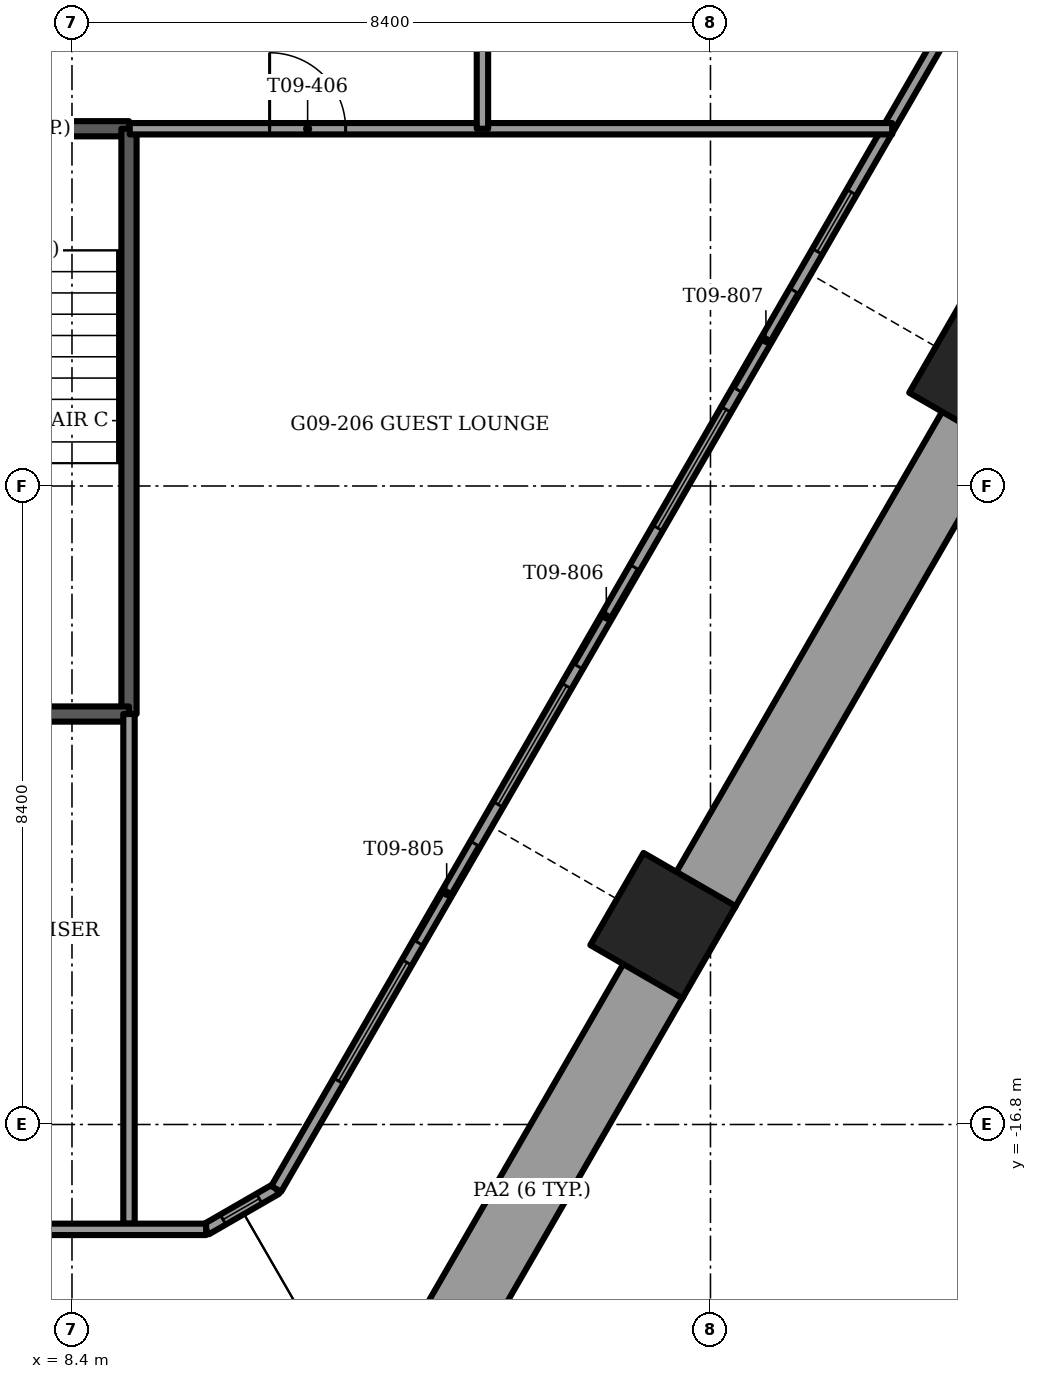
"""IFC4 building model, lengths in metres.
Left out: names, types, materials, properties, quantities, classifications, styles, units other than length and angle.
Written with IfcOpenShell. Run it as: python <this file> out.ifc"""

import sys

from ifc_helpers import new_model, si_unit, direction, frame, frame_2d, origin, origin_2d, place, context, subcontext, project, spatial, rectangle, extrude, element, fill, save


model = new_model("IFC4")
c1 = context("Model", 3, precision=1e-05, world=origin(), true_north=direction((0.0, 1.0)))
c2 = subcontext(c1, "Body", "Model", "MODEL_VIEW")
j1 = project(units=[si_unit("LENGTHUNIT", "METRE"), si_unit("PLANEANGLEUNIT", "RADIAN")], contexts=[c1])
p1 = place(None, origin())
s1 = spatial("IfcSite", under=j1, at=p1, CompositionType="ELEMENT")
p2 = place(p1, origin())
s2 = spatial("IfcBuilding", under=s1, at=p2, CompositionType="ELEMENT")
p3 = place(p2, frame((0.0, 0.0, 39.25)))
s3 = spatial("IfcBuildingStorey", under=s2, at=p3, CompositionType="ELEMENT", Elevation=39.25)
for number, where, z_axis, x_axis in (
    (1, (16.175, -14.183, -1.2), (0.0, 0.0, 1.0), (-0.5, -0.866, 0.0)),
    (2, (20.371, -6.917, -1.2), (0.0, 0.0, 1.0), (-0.5, -0.866, 0.0)),
):
    element("IfcColumn", number, at=place(p3, frame(where, z_axis=z_axis, x_axis=x_axis)), inside=s3, PredefinedType="COLUMN", context=c2, shape_type="SweptSolid", body=[
        extrude(rectangle(XDim=1.4, YDim=1.4, at=origin_2d()), origin(), (0.0, 0.0, 1.0), 3.75),
    ])
p4 = place(p3, frame((12.847, -20.448, 0.0), z_axis=(0.0, 0.0, 1.0), x_axis=(0.500000066162, 0.866025365586, 0.0)))
e3 = element("IfcWall", 3, at=p4, inside=s3, PredefinedType="PARAPET", context=c2, shape_type="SweptSolid", body=[
    extrude(rectangle(XDim=6.42, YDim=0.9, at=frame_2d((3.21, 0.0))), origin(), (0.0, 0.0, 1.0), 1.1),
])
p5 = place(p3, frame((16.727, -13.728, 0.0), z_axis=(0.0, 0.0, 1.0), x_axis=(0.499997206141, 0.866027016814, 0.0)))
e4 = element("IfcWall", 4, at=p5, inside=s3, PredefinedType="PARAPET", context=c2, shape_type="SweptSolid", body=[
    extrude(rectangle(XDim=7.051, YDim=0.9, at=frame_2d((3.525, 0.0))), origin(), (0.0, 0.0, 1.0), 1.1),
])
p6 = place(p3, frame((-10.165, -18.179, 0.0), z_axis=(0.0, 0.0, 1.0), x_axis=(1.0, 0.0, 0.0)))
e5 = element("IfcWall", 5, at=p6, inside=s3, PredefinedType="SOLIDWALL", context=c2, shape_type="SweptSolid", body=[
    extrude(rectangle(XDim=20.329, YDim=0.15, at=frame_2d((10.165, 0.0))), origin(), (0.0, 0.0, 1.0), 3.45),
])
p7 = place(p6, frame((2.064, 0.0, 0.15)))
e6 = element("IfcOpeningElement", 6, at=p7, cuts=e5, PredefinedType="OPENING", context=c2, shape_type="SweptSolid", body=[
    extrude(rectangle(XDim=1.8, YDim=2.85, at=frame_2d((0.9, 1.425))), frame((0.0, 0.075, 0.0), z_axis=(0.0, -1.0, 0.0), x_axis=(1.0, 0.0, 0.0)), (0.0, 0.0, 1.0), 0.15),
])
p8 = place(p6, frame((6.314, 0.0, 0.15)))
e7 = element("IfcOpeningElement", 7, at=p8, cuts=e5, PredefinedType="OPENING", context=c2, shape_type="SweptSolid", body=[
    extrude(rectangle(XDim=0.9, YDim=2.85, at=frame_2d((0.45, 1.425))), frame((0.0, 0.075, 0.0), z_axis=(0.0, -1.0, 0.0), x_axis=(1.0, 0.0, 0.0)), (0.0, 0.0, 1.0), 0.15),
])
p9 = place(p6, frame((7.764, 0.0, 0.0)))
e8 = element("IfcOpeningElement", 8, at=p9, cuts=e5, PredefinedType="OPENING", context=c2, shape_type="SweptSolid", body=[
    extrude(rectangle(XDim=1.5, YDim=2.4, at=frame_2d((0.75, 1.2))), frame((0.0, 0.075, 0.0), z_axis=(0.0, -1.0, 0.0), x_axis=(1.0, 0.0, 0.0)), (0.0, 0.0, 1.0), 0.15),
])
p10 = place(p6, frame((10.514, 0.0, 0.15)))
e9 = element("IfcOpeningElement", 9, at=p10, cuts=e5, PredefinedType="OPENING", context=c2, shape_type="SweptSolid", body=[
    extrude(rectangle(XDim=1.8, YDim=2.85, at=frame_2d((0.9, 1.425))), frame((0.0, 0.075, 0.0), z_axis=(0.0, -1.0, 0.0), x_axis=(1.0, 0.0, 0.0)), (0.0, 0.0, 1.0), 0.15),
])
p11 = place(p6, frame((12.564, 0.0, 0.0)))
e10 = element("IfcOpeningElement", 10, at=p11, cuts=e5, PredefinedType="OPENING", context=c2, shape_type="SweptSolid", body=[
    extrude(rectangle(XDim=1.5, YDim=2.4, at=frame_2d((0.75, 1.2))), frame((0.0, 0.075, 0.0), z_axis=(0.0, -1.0, 0.0), x_axis=(1.0, 0.0, 0.0)), (0.0, 0.0, 1.0), 0.15),
])
p12 = place(p6, frame((16.314, 0.0, 0.15)))
e11 = element("IfcOpeningElement", 11, at=p12, cuts=e5, PredefinedType="OPENING", context=c2, shape_type="SweptSolid", body=[
    extrude(rectangle(XDim=1.8, YDim=2.85, at=frame_2d((0.9, 1.425))), frame((0.0, 0.075, 0.0), z_axis=(0.0, -1.0, 0.0), x_axis=(1.0, 0.0, 0.0)), (0.0, 0.0, 1.0), 0.15),
])
p13 = place(p3, frame((11.087, -17.647, 0.0), z_axis=(0.0, 0.0, 1.0), x_axis=(0.499999841607, 0.866025495233, 0.0)))
e12 = element("IfcWall", 12, at=p13, inside=s3, PredefinedType="SOLIDWALL", context=c2, shape_type="SweptSolid", body=[
    extrude(rectangle(XDim=19.479, YDim=0.15, at=frame_2d((9.739, 0.0))), origin(), (0.0, 0.0, 1.0), 3.45),
])
p14 = place(p13, frame((1.639, 0.0, 0.15)))
e13 = element("IfcOpeningElement", 13, at=p14, cuts=e12, PredefinedType="OPENING", context=c2, shape_type="SweptSolid", body=[
    extrude(rectangle(XDim=1.8, YDim=2.85, at=frame_2d((0.9, 1.425))), frame((0.0, 0.075, 0.0), z_axis=(0.0, -1.0, 0.0), x_axis=(1.0, 0.0, 0.0)), (0.0, 0.0, 1.0), 0.15),
])
p15 = place(p13, frame((3.739, 0.0, 0.0)))
e14 = element("IfcOpeningElement", 14, at=p15, cuts=e12, PredefinedType="OPENING", context=c2, shape_type="SweptSolid", body=[
    extrude(rectangle(XDim=1.5, YDim=2.4, at=frame_2d((0.75, 1.2))), frame((0.0, 0.075, 0.0), z_axis=(0.0, -1.0, 0.0), x_axis=(1.0, 0.0, 0.0)), (0.0, 0.0, 1.0), 0.15),
])
p16 = place(p13, frame((5.839, 0.0, 0.15)))
e15 = element("IfcOpeningElement", 15, at=p16, cuts=e12, PredefinedType="OPENING", context=c2, shape_type="SweptSolid", body=[
    extrude(rectangle(XDim=1.8, YDim=2.85, at=frame_2d((0.9, 1.425))), frame((0.0, 0.075, 0.0), z_axis=(0.0, -1.0, 0.0), x_axis=(1.0, 0.0, 0.0)), (0.0, 0.0, 1.0), 0.15),
])
p17 = place(p13, frame((7.939, 0.0, 0.0)))
e16 = element("IfcOpeningElement", 16, at=p17, cuts=e12, PredefinedType="OPENING", context=c2, shape_type="SweptSolid", body=[
    extrude(rectangle(XDim=1.5, YDim=2.4, at=frame_2d((0.75, 1.2))), frame((0.0, 0.075, 0.0), z_axis=(0.0, -1.0, 0.0), x_axis=(1.0, 0.0, 0.0)), (0.0, 0.0, 1.0), 0.15),
])
p18 = place(p13, frame((10.039, 0.0, 0.15)))
e17 = element("IfcOpeningElement", 17, at=p18, cuts=e12, PredefinedType="OPENING", context=c2, shape_type="SweptSolid", body=[
    extrude(rectangle(XDim=1.8, YDim=2.85, at=frame_2d((0.9, 1.425))), frame((0.0, 0.075, 0.0), z_axis=(0.0, -1.0, 0.0), x_axis=(1.0, 0.0, 0.0)), (0.0, 0.0, 1.0), 0.15),
])
p19 = place(p13, frame((12.139, 0.0, 0.0)))
e18 = element("IfcOpeningElement", 18, at=p19, cuts=e12, PredefinedType="OPENING", context=c2, shape_type="SweptSolid", body=[
    extrude(rectangle(XDim=1.5, YDim=2.4, at=frame_2d((0.75, 1.2))), frame((0.0, 0.075, 0.0), z_axis=(0.0, -1.0, 0.0), x_axis=(1.0, 0.0, 0.0)), (0.0, 0.0, 1.0), 0.15),
])
p20 = place(p13, frame((14.239, 0.0, 0.15)))
e19 = element("IfcOpeningElement", 19, at=p20, cuts=e12, PredefinedType="OPENING", context=c2, shape_type="SweptSolid", body=[
    extrude(rectangle(XDim=0.9, YDim=2.85, at=frame_2d((0.45, 1.425))), frame((0.0, 0.075, 0.0), z_axis=(0.0, -1.0, 0.0), x_axis=(1.0, 0.0, 0.0)), (0.0, 0.0, 1.0), 0.15),
])
p21 = place(p3, frame((10.165, -18.179, 0.0), z_axis=(0.0, 0.0, 1.0), x_axis=(0.866048165231, 0.499960573946, 0.0)))
e20 = element("IfcWall", 20, at=p21, inside=s3, PredefinedType="SOLIDWALL", context=c2, shape_type="SweptSolid", body=[
    extrude(rectangle(XDim=1.065, YDim=0.15, at=frame_2d((0.532, 0.0))), origin(), (0.0, 0.0, 1.0), 3.45),
])
p22 = place(p21, frame((0.258, 0.0, 0.15)))
e21 = element("IfcOpeningElement", 21, at=p22, cuts=e20, PredefinedType="OPENING", context=c2, shape_type="SweptSolid", body=[
    extrude(rectangle(XDim=0.55, YDim=2.85, at=frame_2d((0.275, 1.425))), frame((0.0, 0.075, 0.0), z_axis=(0.0, -1.0, 0.0), x_axis=(1.0, 0.0, 0.0)), (0.0, 0.0, 1.0), 0.15),
])
p23 = place(p3, frame((5.8, -3.7, -0.3), z_axis=(0.0, 0.0, 1.0), x_axis=(1.0, 0.0, 0.0)))
e22 = element("IfcWall", 22, at=p23, inside=s3, PredefinedType="SOLIDWALL", context=c2, shape_type="SweptSolid", body=[
    extrude(rectangle(XDim=3.35, YDim=0.2, at=frame_2d((1.675, 0.0))), origin(), (0.0, 0.0, 1.0), 3.75),
])
p24 = place(p23, frame((1.125, 0.0, 0.0)))
e23 = element("IfcOpeningElement", 23, at=p24, cuts=e22, PredefinedType="OPENING", context=c2, shape_type="SweptSolid", body=[
    extrude(rectangle(XDim=1.1, YDim=2.1, at=frame_2d((0.55, 1.05))), frame((0.0, 0.1, 0.0), z_axis=(0.0, -1.0, 0.0), x_axis=(1.0, 0.0, 0.0)), (0.0, 0.0, 1.0), 0.2),
])
p25 = place(p3, frame((9.15, -3.7, -0.3), z_axis=(0.0, 0.0, 1.0), x_axis=(0.0, -1.0, 0.0)))
e24 = element("IfcWall", 24, at=p25, inside=s3, PredefinedType="SOLIDWALL", context=c2, shape_type="SweptSolid", body=[
    extrude(rectangle(XDim=7.7, YDim=0.2, at=frame_2d((3.85, 0.0))), origin(), (0.0, 0.0, 1.0), 3.75),
])
p26 = place(p3, frame((5.8, -11.4, -0.3), z_axis=(0.0, 0.0, 1.0), x_axis=(1.0, 0.0, 0.0)))
e25 = element("IfcWall", 25, at=p26, inside=s3, PredefinedType="SOLIDWALL", context=c2, shape_type="SweptSolid", body=[
    extrude(rectangle(XDim=3.35, YDim=0.2, at=frame_2d((1.675, 0.0))), origin(), (0.0, 0.0, 1.0), 3.75),
])
p27 = place(p3, frame((9.15, -11.4, 0.0), z_axis=(0.0, 0.0, 1.0), x_axis=(0.0, -1.0, 0.0)))
e26 = element("IfcWall", 26, at=p27, inside=s3, PredefinedType="PARTITIONING", context=c2, shape_type="SweptSolid", body=[
    extrude(rectangle(XDim=6.705, YDim=0.15, at=frame_2d((3.352, 0.0))), origin(), (0.0, 0.0, 1.0), 3.45),
])
p28 = place(p3, frame((9.16, -3.7, 0.0), z_axis=(0.0, 0.0, 1.0), x_axis=(1.0, 0.0, 0.0)))
e27 = element("IfcWall", 27, at=p28, inside=s3, PredefinedType="PARTITIONING", context=c2, shape_type="SweptSolid", body=[
    extrude(rectangle(XDim=10.031, YDim=0.15, at=frame_2d((5.016, 0.0))), origin(), (0.0, 0.0, 1.0), 3.45),
])
p29 = place(p28, frame((1.84, 0.0, 0.0)))
e28 = element("IfcOpeningElement", 28, at=p29, cuts=e27, PredefinedType="OPENING", context=c2, shape_type="SweptSolid", body=[
    extrude(rectangle(XDim=1.0, YDim=2.1, at=frame_2d((0.5, 1.05))), frame((0.0, 0.075, 0.0), z_axis=(0.0, -1.0, 0.0), x_axis=(1.0, 0.0, 0.0)), (0.0, 0.0, 1.0), 0.15),
])
p30 = place(p3, frame((13.8, -3.7, 0.0), z_axis=(0.0, 0.0, 1.0), x_axis=(0.0, 1.0, 0.0)))
e29 = element("IfcWall", 29, at=p30, inside=s3, PredefinedType="PARTITIONING", context=c2, shape_type="SweptSolid", body=[
    extrude(rectangle(XDim=16.247, YDim=0.15, at=frame_2d((8.124, 0.0))), origin(), (0.0, 0.0, 1.0), 3.45),
])
p31 = place(p30, frame((1.705, 0.0, 0.0)))
e30 = element("IfcOpeningElement", 30, at=p31, cuts=e29, PredefinedType="OPENING", context=c2, shape_type="SweptSolid", body=[
    extrude(rectangle(XDim=1.0, YDim=2.1, at=frame_2d((0.5, 1.05))), frame((0.0, 0.075, 0.0), z_axis=(0.0, -1.0, 0.0), x_axis=(1.0, 0.0, 0.0)), (0.0, 0.0, 1.0), 0.15),
])
p32 = place(p30, frame((7.9, 0.0, 0.0)))
e31 = element("IfcOpeningElement", 31, at=p32, cuts=e29, PredefinedType="OPENING", context=c2, shape_type="SweptSolid", body=[
    extrude(rectangle(XDim=1.0, YDim=2.1, at=frame_2d((0.5, 1.05))), frame((0.0, 0.075, 0.0), z_axis=(0.0, -1.0, 0.0), x_axis=(1.0, 0.0, 0.0)), (0.0, 0.0, 1.0), 0.15),
])
p33 = place(p30, frame((12.753, 0.0, 0.0)))
e32 = element("IfcOpeningElement", 32, at=p33, cuts=e29, PredefinedType="OPENING", context=c2, shape_type="SweptSolid", body=[
    extrude(rectangle(XDim=1.0, YDim=2.1, at=frame_2d((0.5, 1.05))), frame((0.0, 0.075, 0.0), z_axis=(0.0, -1.0, 0.0), x_axis=(1.0, 0.0, 0.0)), (0.0, 0.0, 1.0), 0.15),
])
p34 = place(p14, origin())
e33 = element("IfcWindow", 33, at=p34, inside=s3, PartitioningType="SINGLE_PANEL", PredefinedType="WINDOW", context=c2, shape_type="SweptSolid", body=[
    extrude(rectangle(XDim=1.8, YDim=2.85, at=frame_2d((0.9, 1.425))), frame((0.0, 0.03, 0.0), z_axis=(0.0, -1.0, 0.0), x_axis=(1.0, 0.0, 0.0)), (0.0, 0.0, 1.0), 0.06),
])
fill(e13, e33)
p35 = place(p15, origin())
e34 = element("IfcDoor", 34, at=p35, inside=s3, OperationType="SLIDING_TO_LEFT", PredefinedType="DOOR", context=c2, shape_type="SweptSolid", body=[
    extrude(rectangle(XDim=1.5, YDim=2.4, at=frame_2d((0.75, 1.2))), frame((0.0, 0.025, 0.0), z_axis=(0.0, -1.0, 0.0), x_axis=(1.0, 0.0, 0.0)), (0.0, 0.0, 1.0), 0.05),
])
fill(e14, e34)
p36 = place(p16, origin())
e35 = element("IfcWindow", 35, at=p36, inside=s3, PartitioningType="SINGLE_PANEL", PredefinedType="WINDOW", context=c2, shape_type="SweptSolid", body=[
    extrude(rectangle(XDim=1.8, YDim=2.85, at=frame_2d((0.9, 1.425))), frame((0.0, 0.03, 0.0), z_axis=(0.0, -1.0, 0.0), x_axis=(1.0, 0.0, 0.0)), (0.0, 0.0, 1.0), 0.06),
])
fill(e15, e35)
p37 = place(p17, origin())
e36 = element("IfcDoor", 36, at=p37, inside=s3, OperationType="SLIDING_TO_RIGHT", PredefinedType="DOOR", context=c2, shape_type="SweptSolid", body=[
    extrude(rectangle(XDim=1.5, YDim=2.4, at=frame_2d((0.75, 1.2))), frame((0.0, 0.025, 0.0), z_axis=(0.0, -1.0, 0.0), x_axis=(1.0, 0.0, 0.0)), (0.0, 0.0, 1.0), 0.05),
])
fill(e16, e36)
p38 = place(p18, origin())
e37 = element("IfcWindow", 37, at=p38, inside=s3, PartitioningType="SINGLE_PANEL", PredefinedType="WINDOW", context=c2, shape_type="SweptSolid", body=[
    extrude(rectangle(XDim=1.8, YDim=2.85, at=frame_2d((0.9, 1.425))), frame((0.0, 0.03, 0.0), z_axis=(0.0, -1.0, 0.0), x_axis=(1.0, 0.0, 0.0)), (0.0, 0.0, 1.0), 0.06),
])
fill(e17, e37)
p39 = place(p19, origin())
e38 = element("IfcDoor", 38, at=p39, inside=s3, OperationType="SLIDING_TO_LEFT", PredefinedType="DOOR", context=c2, shape_type="SweptSolid", body=[
    extrude(rectangle(XDim=1.5, YDim=2.4, at=frame_2d((0.75, 1.2))), frame((0.0, 0.025, 0.0), z_axis=(0.0, -1.0, 0.0), x_axis=(1.0, 0.0, 0.0)), (0.0, 0.0, 1.0), 0.05),
])
fill(e18, e38)
p40 = place(p20, origin())
e39 = element("IfcWindow", 39, at=p40, inside=s3, PartitioningType="SINGLE_PANEL", PredefinedType="WINDOW", context=c2, shape_type="SweptSolid", body=[
    extrude(rectangle(XDim=0.9, YDim=2.85, at=frame_2d((0.45, 1.425))), frame((0.0, 0.03, 0.0), z_axis=(0.0, -1.0, 0.0), x_axis=(1.0, 0.0, 0.0)), (0.0, 0.0, 1.0), 0.06),
])
fill(e19, e39)
p41 = place(p22, origin())
e40 = element("IfcWindow", 40, at=p41, inside=s3, PartitioningType="SINGLE_PANEL", PredefinedType="WINDOW", context=c2, shape_type="SweptSolid", body=[
    extrude(rectangle(XDim=0.55, YDim=2.85, at=frame_2d((0.275, 1.425))), frame((0.0, 0.03, 0.0), z_axis=(0.0, -1.0, 0.0), x_axis=(1.0, 0.0, 0.0)), (0.0, 0.0, 1.0), 0.06),
])
fill(e21, e40)
p42 = place(p29, origin())
e41 = element("IfcDoor", 41, at=p42, inside=s3, OperationType="SINGLE_SWING_LEFT", PredefinedType="DOOR", context=c2, shape_type="SweptSolid", body=[
    extrude(rectangle(XDim=1.0, YDim=2.1, at=frame_2d((0.5, 1.05))), frame((0.0, 0.025, 0.0), z_axis=(0.0, -1.0, 0.0), x_axis=(1.0, 0.0, 0.0)), (0.0, 0.0, 1.0), 0.05),
])
fill(e28, e41)
save(model, sys.argv[1])
